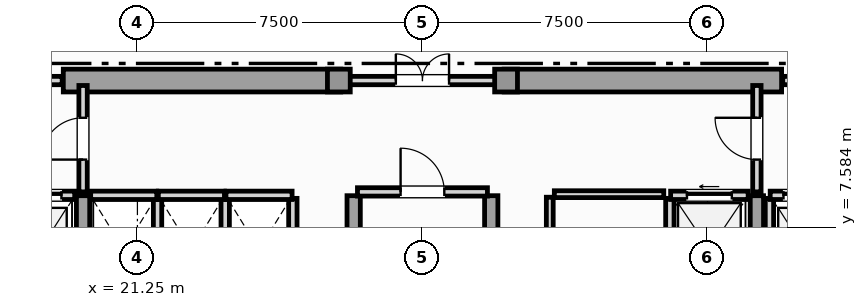
"""IFC4 building model, lengths in metres.
Left out: names, types, materials, properties, quantities, classifications, styles, units other than length and angle.
Written with IfcOpenShell. Run it as: python <this file> out.ifc"""

import sys

from ifc_helpers import new_model, si_unit, direction, frame, frame_2d, origin, origin_2d, place, context, subcontext, project, spatial, rectangle, extrude, element, fill, save


model = new_model("IFC4")
c1 = context("Model", 3, precision=1e-05, world=origin(), true_north=direction((0.0, 1.0)))
c2 = subcontext(c1, "Body", "Model", "MODEL_VIEW")
j1 = project(units=[si_unit("LENGTHUNIT", "METRE"), si_unit("PLANEANGLEUNIT", "RADIAN")], contexts=[c1])
p1 = place(None, origin())
s1 = spatial("IfcSite", under=j1, at=p1, CompositionType="ELEMENT")
p2 = place(p1, origin())
s2 = spatial("IfcBuilding", under=s1, at=p2, CompositionType="ELEMENT")
p3 = place(p2, frame((0.0, 0.0, 187.55)))
s3 = spatial("IfcBuildingStorey", under=s2, at=p3, CompositionType="ELEMENT", Elevation=187.55)
for number, where, z_axis, x_axis in (
    (1, (19.3, 11.45, 0.0), (0.0, 0.0, 1.0), (1.0, 0.0, 0.0)),
    (2, (30.9, 11.45, 0.0), (0.0, 0.0, 1.0), (1.0, 0.0, 0.0)),
):
    element("IfcWall", number, at=place(p3, frame(where, z_axis=z_axis, x_axis=x_axis)), inside=s3, PredefinedType="SHEAR", context=c2, shape_type="SweptSolid", body=[
        extrude(rectangle(XDim=7.3, YDim=0.6, at=frame_2d((3.65, 0.0))), origin(), (0.0, 0.0, 1.0), 4.83),
    ])
for number, where, z_axis, x_axis in (
    (3, (19.82, 0.92, 0.0), (0.0, 0.0, 1.0), (0.0, 1.0, 0.0)),
    (4, (26.94, 0.92, 0.0), (0.0, 0.0, 1.0), (0.0, 1.0, 0.0)),
    (5, (30.56, 0.92, 0.0), (0.0, 0.0, 1.0), (0.0, 1.0, 0.0)),
    (6, (37.55, 0.92, 0.0), (0.0, 0.0, 1.0), (0.0, 1.0, 0.0)),
):
    element("IfcWall", number, at=place(p3, frame(where, z_axis=z_axis, x_axis=x_axis)), inside=s3, PredefinedType="SHEAR", context=c2, shape_type="SweptSolid", body=[
        extrude(rectangle(XDim=7.5, YDim=0.35, at=frame_2d((3.75, 0.0))), origin(), (0.0, 0.0, 1.0), 4.83),
    ])
for number, where, z_axis, x_axis in (
    (7, (26.55, 11.45, 0.0), (0.0, 0.0, 1.0), (1.0, 0.0, 0.0)),
    (8, (30.95, 11.45, 0.0), (0.0, 0.0, 1.0), (1.0, 0.0, 0.0)),
):
    element("IfcColumn", number, at=place(p3, frame(where, z_axis=z_axis, x_axis=x_axis)), inside=s3, PredefinedType="COLUMN", context=c2, shape_type="SweptSolid", body=[
        extrude(rectangle(XDim=0.6, YDim=0.6, at=origin_2d()), origin(), (0.0, 0.0, 1.0), 5.05),
    ])
p4 = place(p3, frame((17.78, 8.43, 0.0), z_axis=(0.0, 0.0, 1.0), x_axis=(1.0, 0.0, 0.0)))
e9 = element("IfcWall", 9, at=p4, inside=s3, PredefinedType="SOLIDWALL", context=c2, shape_type="SweptSolid", body=[
    extrude(rectangle(XDim=1.82, YDim=0.22, at=frame_2d((0.91, 0.0))), origin(), (0.0, 0.0, 1.0), 4.83),
])
p5 = place(p4, frame((0.35, 0.0, 0.0)))
e10 = element("IfcOpeningElement", 10, at=p5, cuts=e9, PredefinedType="OPENING", context=c2, shape_type="SweptSolid", body=[
    extrude(rectangle(XDim=1.12, YDim=2.25, at=frame_2d((0.56, 1.125))), frame((0.0, 0.12, 0.0), z_axis=(0.0, -1.0, 0.0), x_axis=(1.0, 0.0, 0.0)), (0.0, 0.0, 1.0), 0.24),
])
p6 = place(p3, frame((37.88, 5.65, 0.0), z_axis=(0.0, 0.0, 1.0), x_axis=(0.0, 1.0, 0.0)))
e11 = element("IfcWall", 11, at=p6, inside=s3, PredefinedType="SOLIDWALL", context=c2, shape_type="SweptSolid", body=[
    extrude(rectangle(XDim=2.7, YDim=0.22, at=frame_2d((1.35, 0.0))), origin(), (0.0, 0.0, 1.0), 4.83),
])
p7 = place(p3, frame((37.9, 8.43, 0.0), z_axis=(0.0, 0.0, 1.0), x_axis=(1.0, 0.0, 0.0)))
e12 = element("IfcWall", 12, at=p7, inside=s3, PredefinedType="SOLIDWALL", context=c2, shape_type="SweptSolid", body=[
    extrude(rectangle(XDim=1.82, YDim=0.22, at=frame_2d((0.91, 0.0))), origin(), (0.0, 0.0, 1.0), 4.83),
])
p8 = place(p7, frame((0.35, 0.0, 0.0)))
e13 = element("IfcOpeningElement", 13, at=p8, cuts=e12, PredefinedType="OPENING", context=c2, shape_type="SweptSolid", body=[
    extrude(rectangle(XDim=1.12, YDim=2.25, at=frame_2d((0.56, 1.125))), frame((0.0, 0.12, 0.0), z_axis=(0.0, -1.0, 0.0), x_axis=(1.0, 0.0, 0.0)), (0.0, 0.0, 1.0), 0.24),
])
p9 = place(p3, frame((35.26, 5.65, 0.0), z_axis=(0.0, 0.0, 1.0), x_axis=(0.0, 1.0, 0.0)))
e14 = element("IfcWall", 14, at=p9, inside=s3, PredefinedType="SOLIDWALL", context=c2, shape_type="SweptSolid", body=[
    extrude(rectangle(XDim=2.7, YDim=0.22, at=frame_2d((1.35, 0.0))), origin(), (0.0, 0.0, 1.0), 4.83),
])
p10 = place(p3, frame((35.28, 8.43, 0.0), z_axis=(0.0, 0.0, 1.0), x_axis=(1.0, 0.0, 0.0)))
e15 = element("IfcWall", 15, at=p10, inside=s3, PredefinedType="SOLIDWALL", context=c2, shape_type="SweptSolid", body=[
    extrude(rectangle(XDim=2.04, YDim=0.22, at=frame_2d((1.02, 0.0))), origin(), (0.0, 0.0, 1.0), 4.83),
])
p11 = place(p10, frame((0.43, 0.0, 0.0)))
e16 = element("IfcOpeningElement", 16, at=p11, cuts=e15, PredefinedType="OPENING", context=c2, shape_type="SweptSolid", body=[
    extrude(rectangle(XDim=1.18, YDim=2.2, at=frame_2d((0.59, 1.1))), frame((0.0, 0.12, 0.0), z_axis=(0.0, -1.0, 0.0), x_axis=(1.0, 0.0, 0.0)), (0.0, 0.0, 1.0), 0.24),
])
p12 = place(p3, frame((21.78, 5.65, 0.0), z_axis=(0.0, 0.0, 1.0), x_axis=(0.0, 1.0, 0.0)))
e17 = element("IfcWall", 17, at=p12, inside=s3, PredefinedType="SOLIDWALL", context=c2, shape_type="SweptSolid", body=[
    extrude(rectangle(XDim=2.7, YDim=0.22, at=frame_2d((1.35, 0.0))), origin(), (0.0, 0.0, 1.0), 4.83),
])
p13 = place(p3, frame((20.02, 8.43, 0.0), z_axis=(0.0, 0.0, 1.0), x_axis=(1.0, 0.0, 0.0)))
e18 = element("IfcWall", 18, at=p13, inside=s3, PredefinedType="SOLIDWALL", context=c2, shape_type="SweptSolid", body=[
    extrude(rectangle(XDim=1.74, YDim=0.22, at=frame_2d((0.87, 0.0))), origin(), (0.0, 0.0, 1.0), 4.83),
])
p14 = place(p3, frame((23.56, 5.65, 0.0), z_axis=(0.0, 0.0, 1.0), x_axis=(0.0, 1.0, 0.0)))
e19 = element("IfcWall", 19, at=p14, inside=s3, PredefinedType="SOLIDWALL", context=c2, shape_type="SweptSolid", body=[
    extrude(rectangle(XDim=2.7, YDim=0.22, at=frame_2d((1.35, 0.0))), origin(), (0.0, 0.0, 1.0), 4.83),
])
p15 = place(p3, frame((21.8, 8.43, 0.0), z_axis=(0.0, 0.0, 1.0), x_axis=(1.0, 0.0, 0.0)))
e20 = element("IfcWall", 20, at=p15, inside=s3, PredefinedType="SOLIDWALL", context=c2, shape_type="SweptSolid", body=[
    extrude(rectangle(XDim=1.74, YDim=0.22, at=frame_2d((0.87, 0.0))), origin(), (0.0, 0.0, 1.0), 4.83),
])
p16 = place(p3, frame((25.34, 5.65, 0.0), z_axis=(0.0, 0.0, 1.0), x_axis=(0.0, 1.0, 0.0)))
e21 = element("IfcWall", 21, at=p16, inside=s3, PredefinedType="SOLIDWALL", context=c2, shape_type="SweptSolid", body=[
    extrude(rectangle(XDim=2.7, YDim=0.22, at=frame_2d((1.35, 0.0))), origin(), (0.0, 0.0, 1.0), 4.83),
])
p17 = place(p3, frame((23.58, 8.43, 0.0), z_axis=(0.0, 0.0, 1.0), x_axis=(1.0, 0.0, 0.0)))
e22 = element("IfcWall", 22, at=p17, inside=s3, PredefinedType="SOLIDWALL", context=c2, shape_type="SweptSolid", body=[
    extrude(rectangle(XDim=1.74, YDim=0.22, at=frame_2d((0.87, 0.0))), origin(), (0.0, 0.0, 1.0), 4.83),
])
p18 = place(p3, frame((27.04, 8.52, 0.0), z_axis=(0.0, 0.0, 1.0), x_axis=(1.0, 0.0, 0.0)))
e23 = element("IfcWall", 23, at=p18, inside=s3, PredefinedType="SOLIDWALL", context=c2, shape_type="SweptSolid", body=[
    extrude(rectangle(XDim=3.42, YDim=0.22, at=frame_2d((1.71, 0.0))), origin(), (0.0, 0.0, 1.0), 4.83),
])
p19 = place(p18, frame((1.135, 0.0, 0.0)))
e24 = element("IfcOpeningElement", 24, at=p19, cuts=e23, PredefinedType="OPENING", context=c2, shape_type="SweptSolid", body=[
    extrude(rectangle(XDim=1.15, YDim=2.2, at=frame_2d((0.575, 1.1))), frame((0.0, 0.12, 0.0), z_axis=(0.0, -1.0, 0.0), x_axis=(1.0, 0.0, 0.0)), (0.0, 0.0, 1.0), 0.24),
])
p20 = place(p3, frame((19.82, 8.52, 0.0), z_axis=(0.0, 0.0, 1.0), x_axis=(0.0, 1.0, 0.0)))
e25 = element("IfcWall", 25, at=p20, inside=s3, PredefinedType="SOLIDWALL", context=c2, shape_type="SweptSolid", body=[
    extrude(rectangle(XDim=2.8, YDim=0.22, at=frame_2d((1.4, 0.0))), origin(), (0.0, 0.0, 1.0), 4.285),
])
p21 = place(p20, frame((0.85, 0.0, 0.0)))
e26 = element("IfcOpeningElement", 26, at=p21, cuts=e25, PredefinedType="OPENING", context=c2, shape_type="SweptSolid", body=[
    extrude(rectangle(XDim=1.1, YDim=2.2, at=frame_2d((0.55, 1.1))), frame((0.0, 0.12, 0.0), z_axis=(0.0, -1.0, 0.0), x_axis=(1.0, 0.0, 0.0)), (0.0, 0.0, 1.0), 0.24),
])
p22 = place(p3, frame((37.55, 8.52, 0.0), z_axis=(0.0, 0.0, 1.0), x_axis=(0.0, 1.0, 0.0)))
e27 = element("IfcWall", 27, at=p22, inside=s3, PredefinedType="SOLIDWALL", context=c2, shape_type="SweptSolid", body=[
    extrude(rectangle(XDim=2.8, YDim=0.22, at=frame_2d((1.4, 0.0))), origin(), (0.0, 0.0, 1.0), 4.285),
])
p23 = place(p22, frame((0.85, 0.0, 0.0)))
e28 = element("IfcOpeningElement", 28, at=p23, cuts=e27, PredefinedType="OPENING", context=c2, shape_type="SweptSolid", body=[
    extrude(rectangle(XDim=1.1, YDim=2.2, at=frame_2d((0.55, 1.1))), frame((0.0, 0.12, 0.0), z_axis=(0.0, -1.0, 0.0), x_axis=(1.0, 0.0, 0.0)), (0.0, 0.0, 1.0), 0.24),
])
p24 = place(p3, frame((16.23, 11.45, 0.0), z_axis=(0.0, 0.0, 1.0), x_axis=(1.0, 0.0, 0.0)))
e29 = element("IfcWall", 29, at=p24, inside=s3, PredefinedType="SOLIDWALL", context=c2, shape_type="SweptSolid", body=[
    extrude(rectangle(XDim=3.04, YDim=0.22, at=frame_2d((1.52, 0.0))), origin(), (0.0, 0.0, 1.0), 4.83),
])
p25 = place(p24, frame((0.97, 0.0, 0.0)))
e30 = element("IfcOpeningElement", 30, at=p25, cuts=e29, PredefinedType="OPENING", context=c2, shape_type="SweptSolid", body=[
    extrude(rectangle(XDim=1.1, YDim=2.2, at=frame_2d((0.55, 1.1))), frame((0.0, 0.12, 0.0), z_axis=(0.0, -1.0, 0.0), x_axis=(1.0, 0.0, 0.0)), (0.0, 0.0, 1.0), 0.24),
])
p26 = place(p3, frame((26.63, 11.45, 0.0), z_axis=(0.0, 0.0, 1.0), x_axis=(1.0, 0.0, 0.0)))
e31 = element("IfcWall", 31, at=p26, inside=s3, PredefinedType="SOLIDWALL", context=c2, shape_type="SweptSolid", body=[
    extrude(rectangle(XDim=4.24, YDim=0.22, at=frame_2d((2.12, 0.0))), origin(), (0.0, 0.0, 1.0), 4.83),
])
p27 = place(p26, frame((1.42, 0.0, 0.0)))
e32 = element("IfcOpeningElement", 32, at=p27, cuts=e31, PredefinedType="OPENING", context=c2, shape_type="SweptSolid", body=[
    extrude(rectangle(XDim=1.4, YDim=2.2, at=frame_2d((0.7, 1.1))), frame((0.0, 0.12, 0.0), z_axis=(0.0, -1.0, 0.0), x_axis=(1.0, 0.0, 0.0)), (0.0, 0.0, 1.0), 0.24),
])
p28 = place(p3, frame((38.23, 11.45, 0.0), z_axis=(0.0, 0.0, 1.0), x_axis=(1.0, 0.0, 0.0)))
e33 = element("IfcWall", 33, at=p28, inside=s3, PredefinedType="SOLIDWALL", context=c2, shape_type="SweptSolid", body=[
    extrude(rectangle(XDim=3.04, YDim=0.22, at=frame_2d((1.52, 0.0))), origin(), (0.0, 0.0, 1.0), 4.83),
])
p29 = place(p28, frame((0.97, 0.0, 0.0)))
e34 = element("IfcOpeningElement", 34, at=p29, cuts=e33, PredefinedType="OPENING", context=c2, shape_type="SweptSolid", body=[
    extrude(rectangle(XDim=1.1, YDim=2.2, at=frame_2d((0.55, 1.1))), frame((0.0, 0.12, 0.0), z_axis=(0.0, -1.0, 0.0), x_axis=(1.0, 0.0, 0.0)), (0.0, 0.0, 1.0), 0.24),
])
p30 = place(p3, frame((32.1, 5.65, 0.0), z_axis=(0.0, 0.0, 1.0), x_axis=(0.0, 1.0, 0.0)))
e35 = element("IfcWall", 35, at=p30, inside=s3, PredefinedType="PARTITIONING", context=c2, shape_type="SweptSolid", body=[
    extrude(rectangle(XDim=2.73, YDim=0.18, at=frame_2d((1.365, 0.0))), origin(), (0.0, 0.0, 1.0), 4.83),
])
p31 = place(p30, frame((0.925, 0.0, 0.0)))
e36 = element("IfcOpeningElement", 36, at=p31, cuts=e35, PredefinedType="OPENING", context=c2, shape_type="SweptSolid", body=[
    extrude(rectangle(XDim=0.88, YDim=2.05, at=frame_2d((0.44, 1.025))), frame((0.0, 0.1, 0.0), z_axis=(0.0, -1.0, 0.0), x_axis=(1.0, 0.0, 0.0)), (0.0, 0.0, 1.0), 0.2),
])
p32 = place(p3, frame((32.22, 8.46, 0.0), z_axis=(0.0, 0.0, 1.0), x_axis=(1.0, 0.0, 0.0)))
e37 = element("IfcWall", 37, at=p32, inside=s3, PredefinedType="PARTITIONING", context=c2, shape_type="SweptSolid", body=[
    extrude(rectangle(XDim=2.88, YDim=0.18, at=frame_2d((1.44, 0.0))), origin(), (0.0, 0.0, 1.0), 4.83),
])
p33 = place(p5, origin())
e38 = element("IfcDoor", 38, at=p33, inside=s3, OperationType="SLIDING_TO_LEFT", PredefinedType="DOOR", context=c2, shape_type="SweptSolid", body=[
    extrude(rectangle(XDim=1.12, YDim=2.25, at=frame_2d((0.56, 1.125))), frame((0.0, 0.025, 0.0), z_axis=(0.0, -1.0, 0.0), x_axis=(1.0, 0.0, 0.0)), (0.0, 0.0, 1.0), 0.05),
])
fill(e10, e38)
p34 = place(p8, origin())
e39 = element("IfcDoor", 39, at=p34, inside=s3, OperationType="SLIDING_TO_RIGHT", PredefinedType="DOOR", context=c2, shape_type="SweptSolid", body=[
    extrude(rectangle(XDim=1.12, YDim=2.25, at=frame_2d((0.56, 1.125))), frame((0.0, 0.025, 0.0), z_axis=(0.0, -1.0, 0.0), x_axis=(1.0, 0.0, 0.0)), (0.0, 0.0, 1.0), 0.05),
])
fill(e13, e39)
p35 = place(p11, origin())
e40 = element("IfcDoor", 40, at=p35, inside=s3, OperationType="SLIDING_TO_LEFT", PredefinedType="DOOR", context=c2, shape_type="SweptSolid", body=[
    extrude(rectangle(XDim=1.18, YDim=2.2, at=frame_2d((0.59, 1.1))), frame((0.0, 0.025, 0.0), z_axis=(0.0, -1.0, 0.0), x_axis=(1.0, 0.0, 0.0)), (0.0, 0.0, 1.0), 0.05),
])
fill(e16, e40)
p36 = place(p19, origin())
e41 = element("IfcDoor", 41, at=p36, inside=s3, OperationType="SINGLE_SWING_LEFT", PredefinedType="DOOR", context=c2, shape_type="SweptSolid", body=[
    extrude(rectangle(XDim=1.15, YDim=2.2, at=frame_2d((0.575, 1.1))), frame((0.0, 0.025, 0.0), z_axis=(0.0, -1.0, 0.0), x_axis=(1.0, 0.0, 0.0)), (0.0, 0.0, 1.0), 0.05),
])
fill(e24, e41)
p37 = place(p21, origin())
e42 = element("IfcDoor", 42, at=p37, inside=s3, OperationType="SINGLE_SWING_LEFT", PredefinedType="DOOR", context=c2, shape_type="SweptSolid", body=[
    extrude(rectangle(XDim=1.1, YDim=2.2, at=frame_2d((0.55, 1.1))), frame((0.0, 0.025, 0.0), z_axis=(0.0, -1.0, 0.0), x_axis=(1.0, 0.0, 0.0)), (0.0, 0.0, 1.0), 0.05),
])
fill(e26, e42)
p38 = place(p23, origin())
e43 = element("IfcDoor", 43, at=p38, inside=s3, OperationType="SINGLE_SWING_RIGHT", PredefinedType="DOOR", context=c2, shape_type="SweptSolid", body=[
    extrude(rectangle(XDim=1.1, YDim=2.2, at=frame_2d((0.55, 1.1))), frame((0.0, 0.025, 0.0), z_axis=(0.0, -1.0, 0.0), x_axis=(1.0, 0.0, 0.0)), (0.0, 0.0, 1.0), 0.05),
])
fill(e28, e43)
p39 = place(p27, origin())
e44 = element("IfcDoor", 44, at=p39, inside=s3, OperationType="DOUBLE_DOOR_SINGLE_SWING", PredefinedType="DOOR", context=c2, shape_type="SweptSolid", body=[
    extrude(rectangle(XDim=1.4, YDim=2.2, at=frame_2d((0.7, 1.1))), frame((0.0, 0.025, 0.0), z_axis=(0.0, -1.0, 0.0), x_axis=(1.0, 0.0, 0.0)), (0.0, 0.0, 1.0), 0.05),
])
fill(e32, e44)
save(model, sys.argv[1])
